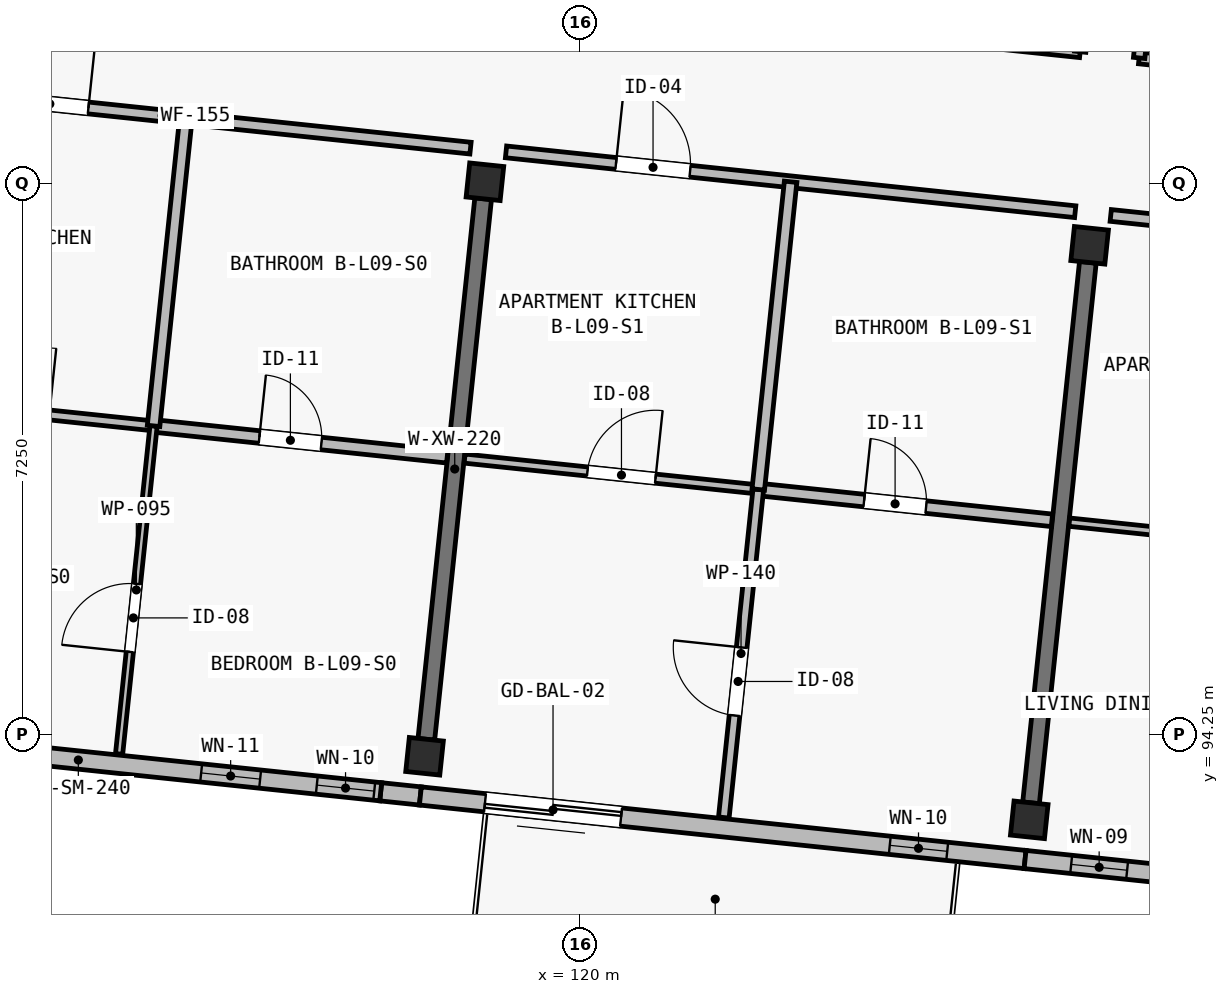
"""IFC4 building model, lengths in metres.
Left out: names, types, materials, properties, quantities, classifications, styles, units other than length and angle.
Written with IfcOpenShell. Run it as: python <this file> out.ifc"""

import sys

from ifc_helpers import new_model, si_unit, direction, frame, frame_2d, origin, origin_2d, place, context, subcontext, project, spatial, polyline, rectangle, outline, extrude, element, fill, save


model = new_model("IFC4")
c1 = context("Model", 3, precision=1e-05, world=origin(), true_north=direction((0.0, 1.0)))
c2 = subcontext(c1, "Body", "Model", "MODEL_VIEW")
j1 = project(units=[si_unit("LENGTHUNIT", "METRE"), si_unit("PLANEANGLEUNIT", "RADIAN")], contexts=[c1])
p1 = place(None, origin())
s1 = spatial("IfcSite", under=j1, at=p1, CompositionType="ELEMENT")
p2 = place(p1, origin())
s2 = spatial("IfcBuilding", under=s1, at=p2, CompositionType="ELEMENT")
p3 = place(p2, frame((0.0, 0.0, 31.15)))
s3 = spatial("IfcBuildingStorey", under=s2, at=p3, CompositionType="ELEMENT", Elevation=31.15)
for number, where, z_axis, x_axis in (
    (1, (117.956, 93.964, 0.0), (0.0, 0.0, 1.0), (0.995, -0.105, 0.0)),
    (2, (118.75, 101.522, 0.0), (0.0, 0.0, 1.0), (0.995, -0.105, 0.0)),
    (3, (125.912, 93.127, 0.0), (0.0, 0.0, 1.0), (0.995, -0.105, 0.0)),
    (4, (126.707, 100.686, 0.0), (0.0, 0.0, 1.0), (0.995, -0.105, 0.0)),
):
    element("IfcColumn", number, at=place(p3, frame(where, z_axis=z_axis, x_axis=x_axis)), inside=s3, PredefinedType="COLUMN", context=c2, shape_type="SweptSolid", body=[
        extrude(rectangle(XDim=0.45, YDim=0.45, at=origin_2d()), origin(), (0.0, 0.0, 1.0), 3.25),
    ])
p4 = place(p3, frame((117.98, 94.188, 0.0), z_axis=(0.0, 0.0, 1.0), x_axis=(0.104519481265, 0.994522839374, 0.0)))
e5 = element("IfcWall", 5, at=p4, inside=s3, PredefinedType="SHEAR", context=c2, shape_type="SweptSolid", body=[
    extrude(rectangle(XDim=7.15, YDim=0.22, at=frame_2d((3.575, 0.0))), origin(), (0.0, 0.0, 1.0), 2.5),
])
p5 = place(p3, frame((125.936, 93.351, 0.0), z_axis=(0.0, 0.0, 1.0), x_axis=(0.104553253602, 0.994519289487, 0.0)))
e6 = element("IfcWall", 6, at=p5, inside=s3, PredefinedType="SHEAR", context=c2, shape_type="SweptSolid", body=[
    extrude(rectangle(XDim=7.15, YDim=0.22, at=frame_2d((3.575, 0.0))), origin(), (0.0, 0.0, 1.0), 2.5),
])
p6 = place(p3, frame((117.901, 93.442, 0.0), z_axis=(0.0, 0.0, 1.0), x_axis=(-0.99451309317, 0.104612176701, 0.0)))
e7 = element("IfcWall", 7, at=p6, inside=s3, PredefinedType="SOLIDWALL", context=c2, shape_type="SweptSolid", body=[
    extrude(rectangle(XDim=0.525, YDim=0.24, at=frame_2d((0.263, 0.0))), origin(), (0.0, 0.0, 1.0), 3.0),
])
p7 = place(p3, frame((117.379, 93.497, 0.0), z_axis=(0.0, 0.0, 1.0), x_axis=(-0.994522329422, 0.104524333444, 0.0)))
e8 = element("IfcWall", 8, at=p7, inside=s3, PredefinedType="SOLIDWALL", context=c2, shape_type="SweptSolid", body=[
    extrude(outline(polyline([(0.0, 0.0), (8.0, 0.0), (8.0, 5.084), (0.0, 6.569), (0.0, 0.0)])), frame((0.0, 0.12, 0.0), z_axis=(0.0, -1.0, 0.0), x_axis=(1.0, 0.0, 0.0)), (0.0, 0.0, 1.0), 0.24),
])
p8 = place(p7, frame((0.085, 0.0, 0.42)))
e9 = element("IfcOpeningElement", 9, at=p8, cuts=e8, PredefinedType="OPENING", context=c2, shape_type="SweptSolid", body=[
    extrude(rectangle(XDim=0.76, YDim=2.34, at=frame_2d((0.38, 1.17))), frame((0.0, 0.135, 0.0), z_axis=(0.0, -1.0, 0.0), x_axis=(1.0, 0.0, 0.0)), (0.0, 0.0, 1.0), 0.27),
])
p9 = place(p7, frame((1.595, 0.0, 0.48)))
e10 = element("IfcOpeningElement", 10, at=p9, cuts=e8, PredefinedType="OPENING", context=c2, shape_type="SweptSolid", body=[
    extrude(rectangle(XDim=0.78, YDim=2.2, at=frame_2d((0.39, 1.1))), frame((0.0, 0.135, 0.0), z_axis=(0.0, -1.0, 0.0), x_axis=(1.0, 0.0, 0.0)), (0.0, 0.0, 1.0), 0.27),
])
p10 = place(p7, frame((4.801, 0.0, 0.42)))
e11 = element("IfcOpeningElement", 11, at=p10, cuts=e8, PredefinedType="OPENING", context=c2, shape_type="SweptSolid", body=[
    extrude(rectangle(XDim=0.82, YDim=2.18, at=frame_2d((0.41, 1.09))), frame((0.0, 0.135, 0.0), z_axis=(0.0, -1.0, 0.0), x_axis=(1.0, 0.0, 0.0)), (0.0, 0.0, 1.0), 0.27),
])
p11 = place(p3, frame((125.857, 92.605, 0.0), z_axis=(0.0, 0.0, 1.0), x_axis=(-0.994522329422, 0.104524333444, 0.0)))
e12 = element("IfcWall", 12, at=p11, inside=s3, PredefinedType="SOLIDWALL", context=c2, shape_type="SweptSolid", body=[
    extrude(rectangle(XDim=8.0, YDim=0.24, at=frame_2d((4.0, 0.0))), origin(), (0.0, 0.0, 1.0), 3.0),
])
p12 = place(p11, frame((5.345, 0.0, 0.0)))
e13 = element("IfcOpeningElement", 13, at=p12, cuts=e12, PredefinedType="OPENING", context=c2, shape_type="SweptSolid", body=[
    extrude(rectangle(XDim=1.8, YDim=2.12, at=frame_2d((0.9, 1.06))), frame((0.0, 0.135, 0.0), z_axis=(0.0, -1.0, 0.0), x_axis=(1.0, 0.0, 0.0)), (0.0, 0.0, 1.0), 0.27),
])
p13 = place(p11, frame((1.03, 0.0, 0.46)))
e14 = element("IfcOpeningElement", 14, at=p13, cuts=e12, PredefinedType="OPENING", context=c2, shape_type="SweptSolid", body=[
    extrude(rectangle(XDim=0.76, YDim=2.34, at=frame_2d((0.38, 1.17))), frame((0.0, 0.135, 0.0), z_axis=(0.0, -1.0, 0.0), x_axis=(1.0, 0.0, 0.0)), (0.0, 0.0, 1.0), 0.27),
])
p14 = place(p3, frame((133.814, 91.769, 0.0), z_axis=(0.0, 0.0, 1.0), x_axis=(-0.994522662826, 0.104521161134, 0.0)))
e15 = element("IfcWall", 15, at=p14, inside=s3, PredefinedType="SOLIDWALL", context=c2, shape_type="SweptSolid", body=[
    extrude(rectangle(XDim=8.0, YDim=0.24, at=frame_2d((4.0, 0.0))), origin(), (0.0, 0.0, 1.0), 3.0),
])
p15 = place(p14, frame((1.285, 0.0, 0.52)))
e16 = element("IfcOpeningElement", 16, at=p15, cuts=e15, PredefinedType="OPENING", context=c2, shape_type="SweptSolid", body=[
    extrude(rectangle(XDim=0.66, YDim=2.32, at=frame_2d((0.33, 1.16))), frame((0.0, 0.135, 0.0), z_axis=(0.0, -1.0, 0.0), x_axis=(1.0, 0.0, 0.0)), (0.0, 0.0, 1.0), 0.27),
])
p16 = place(p14, frame((5.1, 0.0, 0.52)))
e17 = element("IfcOpeningElement", 17, at=p16, cuts=e15, PredefinedType="OPENING", context=c2, shape_type="SweptSolid", body=[
    extrude(rectangle(XDim=0.72, YDim=2.16, at=frame_2d((0.36, 1.08))), frame((0.0, 0.135, 0.0), z_axis=(0.0, -1.0, 0.0), x_axis=(1.0, 0.0, 0.0)), (0.0, 0.0, 1.0), 0.27),
])
p17 = place(p14, frame((6.65, 0.0, 0.42)))
e18 = element("IfcOpeningElement", 18, at=p17, cuts=e15, PredefinedType="OPENING", context=c2, shape_type="SweptSolid", body=[
    extrude(rectangle(XDim=0.74, YDim=2.26, at=frame_2d((0.37, 1.13))), frame((0.0, 0.135, 0.0), z_axis=(0.0, -1.0, 0.0), x_axis=(1.0, 0.0, 0.0)), (0.0, 0.0, 1.0), 0.27),
])
p18 = place(p3, frame((110.446, 102.817, 0.0), z_axis=(0.0, 0.0, 1.0), x_axis=(0.994520852686, -0.104538383252, 0.0)))
e19 = element("IfcWall", 19, at=p18, inside=s3, PredefinedType="PARTITIONING", context=c2, shape_type="SweptSolid", body=[
    extrude(rectangle(XDim=8.16, YDim=0.155, at=frame_2d((4.08, 0.0))), origin(), (0.0, 0.0, 1.0), 2.97),
])
p19 = place(p18, frame((2.085, 0.0, 0.0)))
e20 = element("IfcOpeningElement", 20, at=p19, cuts=e19, PredefinedType="OPENING", context=c2, shape_type="SweptSolid", body=[
    extrude(rectangle(XDim=1.02, YDim=2.2, at=frame_2d((0.51, 1.1))), frame((0.0, 0.093, 0.0), z_axis=(0.0, -1.0, 0.0), x_axis=(1.0, 0.0, 0.0)), (0.0, 0.0, 1.0), 0.185),
])
p20 = place(p3, frame((110.02, 98.77, 0.0), z_axis=(0.0, 0.0, 1.0), x_axis=(0.994525828039, -0.104491039633, 0.0)))
e21 = element("IfcWall", 21, at=p20, inside=s3, PredefinedType="PARTITIONING", context=c2, shape_type="SweptSolid", body=[
    extrude(rectangle(XDim=4.395, YDim=0.13, at=frame_2d((2.198, 0.0))), origin(), (0.0, 0.0, 1.0), 2.97),
])
p21 = place(p20, frame((2.135, 0.0, 0.0)))
e22 = element("IfcOpeningElement", 22, at=p21, cuts=e21, PredefinedType="OPENING", context=c2, shape_type="SweptSolid", body=[
    extrude(rectangle(XDim=0.88, YDim=2.1, at=frame_2d((0.44, 1.05))), frame((0.0, 0.08, 0.0), z_axis=(0.0, -1.0, 0.0), x_axis=(1.0, 0.0, 0.0)), (0.0, 0.0, 1.0), 0.16),
])
p22 = place(p3, frame((114.391, 98.31, 0.0), z_axis=(0.0, 0.0, 1.0), x_axis=(0.994517841934, -0.104567021925, 0.0)))
e23 = element("IfcWall", 23, at=p22, inside=s3, PredefinedType="PLUMBINGWALL", context=c2, shape_type="SweptSolid", body=[
    extrude(rectangle(XDim=3.885, YDim=0.165, at=frame_2d((1.942, 0.0))), origin(), (0.0, 0.0, 1.0), 2.97),
])
p23 = place(p22, frame((1.4, 0.0, 0.0)))
e24 = element("IfcOpeningElement", 24, at=p23, cuts=e23, PredefinedType="OPENING", context=c2, shape_type="SweptSolid", body=[
    extrude(rectangle(XDim=0.82, YDim=2.08, at=frame_2d((0.41, 1.04))), frame((0.0, 0.097, 0.0), z_axis=(0.0, -1.0, 0.0), x_axis=(1.0, 0.0, 0.0)), (0.0, 0.0, 1.0), 0.195),
])
p24 = place(p3, frame((113.937, 93.994, 0.0), z_axis=(0.0, 0.0, 1.0), x_axis=(0.104520797474, 0.994522701046, 0.0)))
e25 = element("IfcWall", 25, at=p24, inside=s3, PredefinedType="PARTITIONING", context=c2, shape_type="SweptSolid", body=[
    extrude(rectangle(XDim=4.34, YDim=0.095, at=frame_2d((2.17, 0.0))), origin(), (0.0, 0.0, 1.0), 2.97),
])
p25 = place(p24, frame((1.35, 0.0, 0.0)))
e26 = element("IfcOpeningElement", 26, at=p25, cuts=e25, PredefinedType="OPENING", context=c2, shape_type="SweptSolid", body=[
    extrude(rectangle(XDim=0.9, YDim=2.1, at=frame_2d((0.45, 1.05))), frame((0.0, 0.062, 0.0), z_axis=(0.0, -1.0, 0.0), x_axis=(1.0, 0.0, 0.0)), (0.0, 0.0, 1.0), 0.125),
])
p26 = place(p3, frame((114.391, 98.31, 0.0), z_axis=(0.0, 0.0, 1.0), x_axis=(0.104556757316, 0.994518921137, 0.0)))
e27 = element("IfcWall", 27, at=p26, inside=s3, PredefinedType="PLUMBINGWALL", context=c2, shape_type="SweptSolid", body=[
    extrude(rectangle(XDim=4.07, YDim=0.165, at=frame_2d((2.035, 0.0))), origin(), (0.0, 0.0, 1.0), 2.97),
])
p27 = place(p3, frame((119.028, 101.915, 0.0), z_axis=(0.0, 0.0, 1.0), x_axis=(0.994521430918, -0.10453288212, 0.0)))
e28 = element("IfcWall", 28, at=p27, inside=s3, PredefinedType="PARTITIONING", context=c2, shape_type="SweptSolid", body=[
    extrude(rectangle(XDim=7.53, YDim=0.155, at=frame_2d((3.765, 0.0))), origin(), (0.0, 0.0, 1.0), 2.97),
])
p28 = place(p27, frame((1.455, 0.0, 0.0)))
e29 = element("IfcOpeningElement", 29, at=p28, cuts=e28, PredefinedType="OPENING", context=c2, shape_type="SweptSolid", body=[
    extrude(rectangle(XDim=0.98, YDim=2.15, at=frame_2d((0.49, 1.075))), frame((0.0, 0.093, 0.0), z_axis=(0.0, -1.0, 0.0), x_axis=(1.0, 0.0, 0.0)), (0.0, 0.0, 1.0), 0.185),
])
p29 = place(p3, frame((118.483, 97.88, 0.0), z_axis=(0.0, 0.0, 1.0), x_axis=(0.994524375082, -0.104504867671, 0.0)))
e30 = element("IfcWall", 30, at=p29, inside=s3, PredefinedType="PARTITIONING", context=c2, shape_type="SweptSolid", body=[
    extrude(rectangle(XDim=3.885, YDim=0.12, at=frame_2d((1.942, 0.0))), origin(), (0.0, 0.0, 1.0), 2.97),
])
p30 = place(p29, frame((1.625, 0.0, 0.0)))
e31 = element("IfcOpeningElement", 31, at=p30, cuts=e30, PredefinedType="OPENING", context=c2, shape_type="SweptSolid", body=[
    extrude(rectangle(XDim=0.9, YDim=2.1, at=frame_2d((0.45, 1.05))), frame((0.0, 0.075, 0.0), z_axis=(0.0, -1.0, 0.0), x_axis=(1.0, 0.0, 0.0)), (0.0, 0.0, 1.0), 0.15),
])
p31 = place(p3, frame((122.347, 97.474, 0.0), z_axis=(0.0, 0.0, 1.0), x_axis=(0.994517841934, -0.104567021925, 0.0)))
e32 = element("IfcWall", 32, at=p31, inside=s3, PredefinedType="PLUMBINGWALL", context=c2, shape_type="SweptSolid", body=[
    extrude(rectangle(XDim=3.885, YDim=0.165, at=frame_2d((1.942, 0.0))), origin(), (0.0, 0.0, 1.0), 2.97),
])
p32 = place(p31, frame((1.4, 0.0, 0.0)))
e33 = element("IfcOpeningElement", 33, at=p32, cuts=e32, PredefinedType="OPENING", context=c2, shape_type="SweptSolid", body=[
    extrude(rectangle(XDim=0.82, YDim=2.08, at=frame_2d((0.41, 1.04))), frame((0.0, 0.097, 0.0), z_axis=(0.0, -1.0, 0.0), x_axis=(1.0, 0.0, 0.0)), (0.0, 0.0, 1.0), 0.195),
])
p33 = place(p3, frame((121.894, 93.158, 0.0), z_axis=(0.0, 0.0, 1.0), x_axis=(0.104514950243, 0.994523315552, 0.0)))
e34 = element("IfcWall", 34, at=p33, inside=s3, PredefinedType="PARTITIONING", context=c2, shape_type="SweptSolid", body=[
    extrude(rectangle(XDim=4.34, YDim=0.14, at=frame_2d((2.17, 0.0))), origin(), (0.0, 0.0, 1.0), 2.97),
])
p34 = place(p33, frame((1.35, 0.0, 0.0)))
e35 = element("IfcOpeningElement", 35, at=p34, cuts=e34, PredefinedType="OPENING", context=c2, shape_type="SweptSolid", body=[
    extrude(rectangle(XDim=0.9, YDim=2.1, at=frame_2d((0.45, 1.05))), frame((0.0, 0.085, 0.0), z_axis=(0.0, -1.0, 0.0), x_axis=(1.0, 0.0, 0.0)), (0.0, 0.0, 1.0), 0.17),
])
p35 = place(p3, frame((122.347, 97.474, 0.0), z_axis=(0.0, 0.0, 1.0), x_axis=(0.104497425874, 0.99452515704, 0.0)))
e36 = element("IfcWall", 36, at=p35, inside=s3, PredefinedType="PLUMBINGWALL", context=c2, shape_type="SweptSolid", body=[
    extrude(rectangle(XDim=4.07, YDim=0.165, at=frame_2d((2.035, 0.0))), origin(), (0.0, 0.0, 1.0), 2.97),
])
p36 = place(p3, frame((126.984, 101.079, 0.0), z_axis=(0.0, 0.0, 1.0), x_axis=(0.994521785195, -0.104529511491, 0.0)))
e37 = element("IfcWall", 37, at=p36, inside=s3, PredefinedType="PARTITIONING", context=c2, shape_type="SweptSolid", body=[
    extrude(rectangle(XDim=7.53, YDim=0.155, at=frame_2d((3.765, 0.0))), origin(), (0.0, 0.0, 1.0), 2.97),
])
p37 = place(p36, frame((1.455, 0.0, 0.0)))
e38 = element("IfcOpeningElement", 38, at=p37, cuts=e37, PredefinedType="OPENING", context=c2, shape_type="SweptSolid", body=[
    extrude(rectangle(XDim=1.02, YDim=2.2, at=frame_2d((0.51, 1.1))), frame((0.0, 0.093, 0.0), z_axis=(0.0, -1.0, 0.0), x_axis=(1.0, 0.0, 0.0)), (0.0, 0.0, 1.0), 0.185),
])
p38 = place(p3, frame((126.44, 97.044, 0.0), z_axis=(0.0, 0.0, 1.0), x_axis=(0.994517154753, -0.104573557378, 0.0)))
e39 = element("IfcWall", 39, at=p38, inside=s3, PredefinedType="PARTITIONING", context=c2, shape_type="SweptSolid", body=[
    extrude(rectangle(XDim=3.885, YDim=0.11, at=frame_2d((1.942, 0.0))), origin(), (0.0, 0.0, 1.0), 2.97),
])
p39 = place(p38, frame((1.625, 0.0, 0.0)))
e40 = element("IfcOpeningElement", 40, at=p39, cuts=e39, PredefinedType="OPENING", context=c2, shape_type="SweptSolid", body=[
    extrude(rectangle(XDim=0.9, YDim=2.1, at=frame_2d((0.45, 1.05))), frame((0.0, 0.07, 0.0), z_axis=(0.0, -1.0, 0.0), x_axis=(1.0, 0.0, 0.0)), (0.0, 0.0, 1.0), 0.14),
])
p40 = place(p3, frame((119.402, 103.988, 0.0), z_axis=(0.0, 0.0, 1.0), x_axis=(0.994522671024, -0.104521083137, 0.0)))
e41 = element("IfcWall", 41, at=p40, inside=s3, PredefinedType="PARTITIONING", context=c2, shape_type="SweptSolid", body=[
    extrude(rectangle(XDim=7.22, YDim=0.155, at=frame_2d((3.61, 0.0))), origin(), (0.0, 0.0, 1.0), 2.97),
])
p41 = place(p40, frame((1.305, 0.0, 0.0)))
e42 = element("IfcOpeningElement", 42, at=p41, cuts=e41, PredefinedType="OPENING", context=c2, shape_type="SweptSolid", body=[
    extrude(rectangle(XDim=0.98, YDim=2.15, at=frame_2d((0.49, 1.075))), frame((0.0, 0.093, 0.0), z_axis=(0.0, -1.0, 0.0), x_axis=(1.0, 0.0, 0.0)), (0.0, 0.0, 1.0), 0.185),
])
p42 = place(p3, frame((126.582, 103.233, 0.0), z_axis=(0.0, 0.0, 1.0), x_axis=(0.10453284543, 0.994521434775, 0.0)))
e43 = element("IfcWall", 43, at=p42, inside=s3, PredefinedType="PARTITIONING", context=c2, shape_type="SweptSolid", body=[
    extrude(rectangle(XDim=9.87, YDim=0.15, at=frame_2d((4.935, 0.0))), origin(), (0.0, 0.0, 1.0), 2.97),
])
p43 = place(p3, frame((127.358, 103.151, 0.0), z_axis=(0.0, 0.0, 1.0), x_axis=(0.994522671024, -0.104521083137, 0.0)))
e44 = element("IfcWall", 44, at=p43, inside=s3, PredefinedType="PARTITIONING", context=c2, shape_type="SweptSolid", body=[
    extrude(rectangle(XDim=7.22, YDim=0.155, at=frame_2d((3.61, 0.0))), origin(), (0.0, 0.0, 1.0), 2.97),
])
p44 = place(p43, frame((1.305, 0.0, 0.0)))
e45 = element("IfcOpeningElement", 45, at=p44, cuts=e44, PredefinedType="OPENING", context=c2, shape_type="SweptSolid", body=[
    extrude(rectangle(XDim=1.02, YDim=2.2, at=frame_2d((0.51, 1.1))), frame((0.0, 0.093, 0.0), z_axis=(0.0, -1.0, 0.0), x_axis=(1.0, 0.0, 0.0)), (0.0, 0.0, 1.0), 0.185),
])
p45 = place(p3, frame((127.358, 103.151, 0.0), z_axis=(0.0, 0.0, 1.0), x_axis=(0.104508379977, 0.994524006002, 0.0)))
e46 = element("IfcWall", 46, at=p45, inside=s3, PredefinedType="PARTITIONING", context=c2, shape_type="SweptSolid", body=[
    extrude(rectangle(XDim=9.87, YDim=0.15, at=frame_2d((4.935, 0.0))), origin(), (0.0, 0.0, 1.0), 2.97),
])
p46 = place(p8, origin())
e47 = element("IfcWindow", 47, at=p46, inside=s3, PartitioningType="SINGLE_PANEL", PredefinedType="WINDOW", context=c2, shape_type="SweptSolid", body=[
    extrude(rectangle(XDim=0.76, YDim=2.34, at=frame_2d((0.38, 1.17))), frame((0.0, 0.03, 0.0), z_axis=(0.0, -1.0, 0.0), x_axis=(1.0, 0.0, 0.0)), (0.0, 0.0, 1.0), 0.06),
])
fill(e9, e47)
p47 = place(p9, origin())
e48 = element("IfcWindow", 48, at=p47, inside=s3, PartitioningType="SINGLE_PANEL", PredefinedType="WINDOW", context=c2, shape_type="SweptSolid", body=[
    extrude(rectangle(XDim=0.78, YDim=2.2, at=frame_2d((0.39, 1.1))), frame((0.0, 0.03, 0.0), z_axis=(0.0, -1.0, 0.0), x_axis=(1.0, 0.0, 0.0)), (0.0, 0.0, 1.0), 0.06),
])
fill(e10, e48)
p48 = place(p12, origin())
e49 = element("IfcDoor", 49, at=p48, inside=s3, OperationType="SLIDING_TO_LEFT", PredefinedType="DOOR", context=c2, shape_type="SweptSolid", body=[
    extrude(rectangle(XDim=1.8, YDim=2.12, at=frame_2d((0.9, 1.06))), frame((0.0, 0.025, 0.0), z_axis=(0.0, -1.0, 0.0), x_axis=(1.0, 0.0, 0.0)), (0.0, 0.0, 1.0), 0.05),
])
fill(e13, e49)
p49 = place(p13, origin())
e50 = element("IfcWindow", 50, at=p49, inside=s3, PartitioningType="SINGLE_PANEL", PredefinedType="WINDOW", context=c2, shape_type="SweptSolid", body=[
    extrude(rectangle(XDim=0.76, YDim=2.34, at=frame_2d((0.38, 1.17))), frame((0.0, 0.03, 0.0), z_axis=(0.0, -1.0, 0.0), x_axis=(1.0, 0.0, 0.0)), (0.0, 0.0, 1.0), 0.06),
])
fill(e14, e50)
p50 = place(p17, origin())
e51 = element("IfcWindow", 51, at=p50, inside=s3, PartitioningType="SINGLE_PANEL", PredefinedType="WINDOW", context=c2, shape_type="SweptSolid", body=[
    extrude(rectangle(XDim=0.74, YDim=2.26, at=frame_2d((0.37, 1.13))), frame((0.0, 0.03, 0.0), z_axis=(0.0, -1.0, 0.0), x_axis=(1.0, 0.0, 0.0)), (0.0, 0.0, 1.0), 0.06),
])
fill(e18, e51)
p51 = place(p19, origin())
e52 = element("IfcDoor", 52, at=p51, inside=s3, OperationType="SINGLE_SWING_RIGHT", PredefinedType="DOOR", context=c2, shape_type="SweptSolid", body=[
    extrude(rectangle(XDim=1.02, YDim=2.2, at=frame_2d((0.51, 1.1))), frame((0.0, 0.025, 0.0), z_axis=(0.0, -1.0, 0.0), x_axis=(1.0, 0.0, 0.0)), (0.0, 0.0, 1.0), 0.05),
])
fill(e20, e52)
p52 = place(p23, origin())
e53 = element("IfcDoor", 53, at=p52, inside=s3, OperationType="SINGLE_SWING_LEFT", PredefinedType="DOOR", context=c2, shape_type="SweptSolid", body=[
    extrude(rectangle(XDim=0.82, YDim=2.08, at=frame_2d((0.41, 1.04))), frame((0.0, 0.025, 0.0), z_axis=(0.0, -1.0, 0.0), x_axis=(1.0, 0.0, 0.0)), (0.0, 0.0, 1.0), 0.05),
])
fill(e24, e53)
p53 = place(p25, origin())
e54 = element("IfcDoor", 54, at=p53, inside=s3, OperationType="SINGLE_SWING_LEFT", PredefinedType="DOOR", context=c2, shape_type="SweptSolid", body=[
    extrude(rectangle(XDim=0.9, YDim=2.1, at=frame_2d((0.45, 1.05))), frame((0.0, 0.025, 0.0), z_axis=(0.0, -1.0, 0.0), x_axis=(1.0, 0.0, 0.0)), (0.0, 0.0, 1.0), 0.05),
])
fill(e26, e54)
p54 = place(p28, origin())
e55 = element("IfcDoor", 55, at=p54, inside=s3, OperationType="SINGLE_SWING_LEFT", PredefinedType="DOOR", context=c2, shape_type="SweptSolid", body=[
    extrude(rectangle(XDim=0.98, YDim=2.15, at=frame_2d((0.49, 1.075))), frame((0.0, 0.025, 0.0), z_axis=(0.0, -1.0, 0.0), x_axis=(1.0, 0.0, 0.0)), (0.0, 0.0, 1.0), 0.05),
])
fill(e29, e55)
p55 = place(p30, origin())
e56 = element("IfcDoor", 56, at=p55, inside=s3, OperationType="SINGLE_SWING_RIGHT", PredefinedType="DOOR", context=c2, shape_type="SweptSolid", body=[
    extrude(rectangle(XDim=0.9, YDim=2.1, at=frame_2d((0.45, 1.05))), frame((0.0, 0.025, 0.0), z_axis=(0.0, -1.0, 0.0), x_axis=(1.0, 0.0, 0.0)), (0.0, 0.0, 1.0), 0.05),
])
fill(e31, e56)
p56 = place(p32, origin())
e57 = element("IfcDoor", 57, at=p56, inside=s3, OperationType="SINGLE_SWING_LEFT", PredefinedType="DOOR", context=c2, shape_type="SweptSolid", body=[
    extrude(rectangle(XDim=0.82, YDim=2.08, at=frame_2d((0.41, 1.04))), frame((0.0, 0.025, 0.0), z_axis=(0.0, -1.0, 0.0), x_axis=(1.0, 0.0, 0.0)), (0.0, 0.0, 1.0), 0.05),
])
fill(e33, e57)
p57 = place(p34, origin())
e58 = element("IfcDoor", 58, at=p57, inside=s3, OperationType="SINGLE_SWING_RIGHT", PredefinedType="DOOR", context=c2, shape_type="SweptSolid", body=[
    extrude(rectangle(XDim=0.9, YDim=2.1, at=frame_2d((0.45, 1.05))), frame((0.0, 0.025, 0.0), z_axis=(0.0, -1.0, 0.0), x_axis=(1.0, 0.0, 0.0)), (0.0, 0.0, 1.0), 0.05),
])
fill(e35, e58)
save(model, sys.argv[1])
